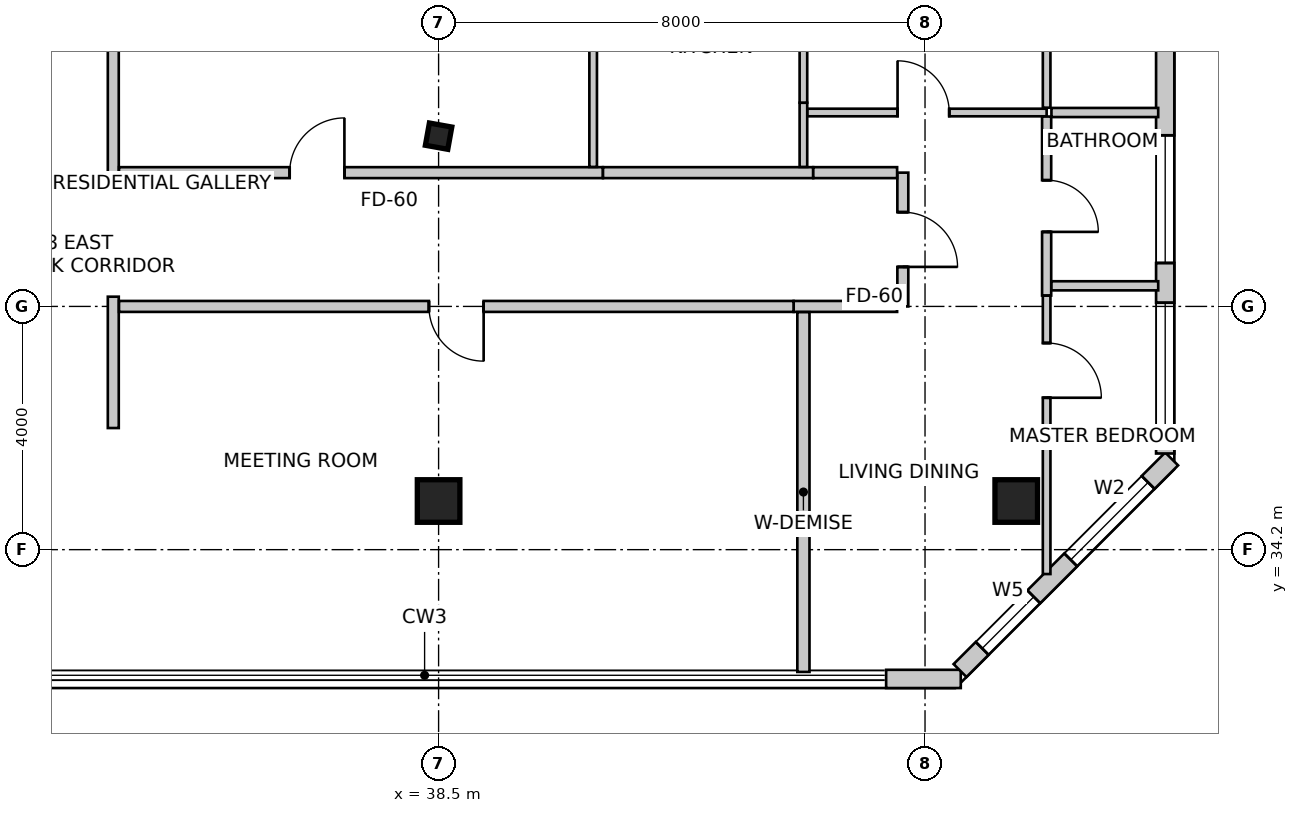
"""IFC4 building model, lengths in metres.
Left out: names, types, materials, properties, quantities, classifications, styles, units other than length and angle.
Written with IfcOpenShell. Run it as: python <this file> out.ifc"""

import sys

from ifc_helpers import new_model, si_unit, direction, frame, frame_2d, origin, origin_2d, place, context, subcontext, project, spatial, rectangle, i_section, extrude, source, transform, mapped, element, fill, save


model = new_model("IFC4")
c1 = context("Model", 3, precision=1e-05, world=origin(), true_north=direction((0.0, 1.0)))
c2 = subcontext(c1, "Body", "Model", "MODEL_VIEW")
j1 = project(units=[si_unit("LENGTHUNIT", "METRE"), si_unit("PLANEANGLEUNIT", "RADIAN")], contexts=[c1])
p1 = place(None, origin())
s1 = spatial("IfcSite", under=j1, at=p1, CompositionType="ELEMENT")
p2 = place(p1, origin())
s2 = spatial("IfcBuilding", under=s1, at=p2, CompositionType="ELEMENT")
p3 = place(p2, frame((0.0, 0.0, 193.9)))
s3 = spatial("IfcBuildingStorey", under=s2, at=p3, CompositionType="ELEMENT", Elevation=193.9)
m1 = source(origin(), c2, "Body", "SweptSolid", [
    extrude(rectangle(XDim=0.7, YDim=0.7, at=origin_2d()), origin(), (0.0, 0.0, 1.0), 3.5),
])
for number, where, z_axis, x_axis in (
    (1, (38.5, 35.0, 0.0), (0.0, 0.0, 1.0), (1.0, 0.0, 0.0)),
    (2, (48.0, 35.0, 0.0), (0.0, 0.0, 1.0), (1.0, 0.0, 0.0)),
):
    element("IfcColumn", number, at=place(p3, frame(where, z_axis=z_axis, x_axis=x_axis)), inside=s3, PredefinedType="COLUMN", context=c2, shape_type="MappedRepresentation", body=[
        mapped(m1, transform((0.0, 0.0, 0.0), scale=1.0)),
    ])
m2 = source(origin(), c2, "Body", "SweptSolid", [
    extrude(i_section(OverallWidth=0.374, OverallDepth=0.372, WebThickness=0.016, FlangeThickness=0.026, FilletRadius=0.015, at=origin_2d()), origin(), (0.0, 0.0, 1.0), 3.5),
])
p4 = place(p3, frame((38.5, 41.0, 0.0), z_axis=(0.0, 0.0, 1.0), x_axis=(0.984195607969, -0.17708474032, 0.0)))
e3 = element("IfcColumn", 3, at=p4, inside=s3, PredefinedType="COLUMN", context=c2, shape_type="MappedRepresentation", body=[
    mapped(m2, transform((0.0, 0.0, 0.0), scale=1.0)),
])
p5 = place(p3, frame((45.86, 32.074, 0.0), z_axis=(0.0, 0.0, 1.0), x_axis=(1.0, 0.0, 0.0)))
e4 = element("IfcWall", 4, at=p5, inside=s3, PredefinedType="SOLIDWALL", context=c2, shape_type="SweptSolid", body=[
    extrude(rectangle(XDim=1.228, YDim=0.3, at=frame_2d((0.614, 0.0))), origin(), (0.0, 0.0, 1.0), 3.25),
])
p6 = place(p3, frame((47.076, 32.212, 0.0), z_axis=(0.0, 0.0, 1.0), x_axis=(0.707106781187, 0.707106781187, 0.0)))
e5 = element("IfcWall", 5, at=p6, inside=s3, PredefinedType="SOLIDWALL", context=c2, shape_type="SweptSolid", body=[
    extrude(rectangle(XDim=4.922, YDim=0.3, at=frame_2d((2.461, 0.0))), origin(), (0.0, 0.0, 1.0), 3.25),
])
m3 = source(origin(), c2, "Body", "SweptSolid", [
    extrude(rectangle(XDim=1.2, YDim=1.6, at=frame_2d((0.6, 0.8))), frame((0.0, 0.16, 0.0), z_axis=(0.0, -1.0, 0.0), x_axis=(1.0, 0.0, 0.0)), (0.0, 0.0, 1.0), 0.32),
])
p7 = place(p6, frame((0.515, 0.0, 0.85)))
e6 = element("IfcOpeningElement", 6, at=p7, cuts=e5, PredefinedType="OPENING", context=c2, shape_type="MappedRepresentation", body=[
    mapped(m3, transform((0.0, 0.0, 0.0), scale=1.0)),
])
m4 = source(origin(), c2, "Body", "SweptSolid", [
    extrude(rectangle(XDim=1.8, YDim=2.1, at=frame_2d((0.9, 1.05))), frame((0.0, 0.16, 0.0), z_axis=(0.0, -1.0, 0.0), x_axis=(1.0, 0.0, 0.0)), (0.0, 0.0, 1.0), 0.32),
])
p8 = place(p6, frame((2.575, 0.0, 0.85)))
e7 = element("IfcOpeningElement", 7, at=p8, cuts=e5, PredefinedType="OPENING", context=c2, shape_type="MappedRepresentation", body=[
    mapped(m4, transform((0.0, 0.0, 0.0), scale=1.0)),
])
p9 = place(p3, frame((50.45, 35.781, 0.0), z_axis=(0.0, 0.0, 1.0), x_axis=(0.0, 1.0, 0.0)))
e8 = element("IfcWall", 8, at=p9, inside=s3, PredefinedType="SOLIDWALL", context=c2, shape_type="SweptSolid", body=[
    extrude(rectangle(XDim=10.731, YDim=0.3, at=frame_2d((5.365, 0.0))), origin(), (0.0, 0.0, 1.0), 3.25),
])
m5 = source(origin(), c2, "Body", "SweptSolid", [
    extrude(rectangle(XDim=2.1, YDim=2.0, at=frame_2d((1.05, 1.0))), frame((0.0, 0.16, 0.0), z_axis=(0.0, -1.0, 0.0), x_axis=(1.0, 0.0, 0.0)), (0.0, 0.0, 1.0), 0.32),
])
p10 = place(p9, frame((0.379, 0.0, 0.85)))
e9 = element("IfcOpeningElement", 9, at=p10, cuts=e8, PredefinedType="OPENING", context=c2, shape_type="MappedRepresentation", body=[
    mapped(m5, transform((0.0, 0.0, 0.0), scale=1.0)),
])
p11 = place(p9, frame((3.133, 0.0, 0.85)))
e10 = element("IfcOpeningElement", 10, at=p11, cuts=e8, PredefinedType="OPENING", context=c2, shape_type="MappedRepresentation", body=[
    mapped(m5, transform((0.0, 0.0, 0.0), scale=1.0)),
])
m6 = source(origin(), c2, "Body", "SweptSolid", [
    extrude(rectangle(XDim=2.4, YDim=2.2, at=frame_2d((1.2, 1.1))), frame((0.0, 0.16, 0.0), z_axis=(0.0, -1.0, 0.0), x_axis=(1.0, 0.0, 0.0)), (0.0, 0.0, 1.0), 0.32),
])
p12 = place(p9, frame((6.919, 0.0, 0.85)))
e11 = element("IfcOpeningElement", 11, at=p12, cuts=e8, PredefinedType="OPENING", context=c2, shape_type="MappedRepresentation", body=[
    mapped(m6, transform((0.0, 0.0, 0.0), scale=1.0)),
])
p13 = place(p3, frame((33.15, 45.766, 0.0), z_axis=(0.0, 0.0, 1.0), x_axis=(0.0, -1.0, 0.0)))
e12 = element("IfcWall", 12, at=p13, inside=s3, PredefinedType="PARTITIONING", context=c2, shape_type="SweptSolid", body=[
    extrude(rectangle(XDim=5.526, YDim=0.18, at=frame_2d((2.763, 0.0))), origin(), (0.0, 0.0, 1.0), 2.688),
])
p14 = place(p3, frame((33.15, 38.36, 0.0), z_axis=(0.0, 0.0, 1.0), x_axis=(0.0, -1.0, 0.0)))
e13 = element("IfcWall", 13, at=p14, inside=s3, PredefinedType="PARTITIONING", context=c2, shape_type="SweptSolid", body=[
    extrude(rectangle(XDim=2.16, YDim=0.18, at=frame_2d((1.08, 0.0))), origin(), (0.0, 0.0, 1.0), 3.25),
])
p15 = place(p3, frame((33.244, 40.4, 0.0), z_axis=(0.0, 0.0, 1.0), x_axis=(1.0, 0.0, 0.0)))
e14 = element("IfcWall", 14, at=p15, inside=s3, PredefinedType="PARTITIONING", context=c2, shape_type="SweptSolid", body=[
    extrude(rectangle(XDim=7.958, YDim=0.18, at=frame_2d((3.979, 0.0))), origin(), (0.0, 0.0, 1.0), 2.688),
])
m7 = source(origin(), c2, "Body", "SweptSolid", [
    extrude(rectangle(XDim=0.9, YDim=2.15, at=frame_2d((0.45, 1.075))), frame((0.0, 0.1, 0.0), z_axis=(0.0, -1.0, 0.0), x_axis=(1.0, 0.0, 0.0)), (0.0, 0.0, 1.0), 0.2),
])
p16 = place(p15, frame((2.807, 0.0, 0.0)))
e15 = element("IfcOpeningElement", 15, at=p16, cuts=e14, PredefinedType="OPENING", context=c2, shape_type="MappedRepresentation", body=[
    mapped(m7, transform((0.0, 0.0, 0.0), scale=1.0)),
])
p17 = place(p3, frame((41.204, 40.4, 0.0), z_axis=(0.0, 0.0, 1.0), x_axis=(1.0, 0.0, 0.0)))
e16 = element("IfcWall", 16, at=p17, inside=s3, PredefinedType="PARTITIONING", context=c2, shape_type="SweptSolid", body=[
    extrude(rectangle(XDim=3.456, YDim=0.18, at=frame_2d((1.728, 0.0))), origin(), (0.0, 0.0, 1.0), 2.688),
])
p18 = place(p3, frame((46.135, 40.4, 0.0), z_axis=(0.0, 0.0, 1.0), x_axis=(0.0, -1.0, 0.0)))
e17 = element("IfcWall", 17, at=p18, inside=s3, PredefinedType="PARTITIONING", context=c2, shape_type="SweptSolid", body=[
    extrude(rectangle(XDim=2.2, YDim=0.18, at=frame_2d((1.1, 0.0))), origin(), (0.0, 0.0, 1.0), 3.25),
])
p19 = place(p18, frame((0.65, 0.0, 0.0)))
e18 = element("IfcOpeningElement", 18, at=p19, cuts=e17, PredefinedType="OPENING", context=c2, shape_type="MappedRepresentation", body=[
    mapped(m7, transform((0.0, 0.0, 0.0), scale=1.0)),
])
p20 = place(p3, frame((44.662, 40.4, 0.0), z_axis=(0.0, 0.0, 1.0), x_axis=(1.0, 0.0, 0.0)))
e19 = element("IfcWall", 19, at=p20, inside=s3, PredefinedType="PARTITIONING", context=c2, shape_type="SweptSolid", body=[
    extrude(rectangle(XDim=1.379, YDim=0.18, at=frame_2d((0.689, 0.0))), origin(), (0.0, 0.0, 1.0), 3.25),
])
p21 = place(p3, frame((46.041, 38.2, 0.0), z_axis=(0.0, 0.0, 1.0), x_axis=(-1.0, 0.0, 0.0)))
e20 = element("IfcWall", 20, at=p21, inside=s3, PredefinedType="PARTITIONING", context=c2, shape_type="SweptSolid", body=[
    extrude(rectangle(XDim=1.701, YDim=0.18, at=frame_2d((0.851, 0.0))), origin(), (0.0, 0.0, 1.0), 2.835),
])
p22 = place(p3, frame((44.338, 38.2, 0.0), z_axis=(0.0, 0.0, 1.0), x_axis=(-1.0, 0.0, 0.0)))
e21 = element("IfcWall", 21, at=p22, inside=s3, PredefinedType="PARTITIONING", context=c2, shape_type="SweptSolid", body=[
    extrude(rectangle(XDim=11.094, YDim=0.18, at=frame_2d((5.547, 0.0))), origin(), (0.0, 0.0, 1.0), 2.688),
])
p23 = place(p22, frame((5.097, 0.0, 0.0)))
e22 = element("IfcOpeningElement", 22, at=p23, cuts=e21, PredefinedType="OPENING", context=c2, shape_type="MappedRepresentation", body=[
    mapped(m7, transform((0.0, 0.0, 0.0), scale=1.0)),
])
p24 = place(p3, frame((41.042, 45.606, 0.0), z_axis=(0.0, 0.0, 1.0), x_axis=(0.0, -1.0, 0.0)))
e23 = element("IfcWall", 23, at=p24, inside=s3, PredefinedType="PARTITIONING", context=c2, shape_type="SweptSolid", body=[
    extrude(rectangle(XDim=5.112, YDim=0.125, at=frame_2d((2.556, 0.0))), origin(), (0.0, 0.0, 1.0), 2.688),
])
m8 = source(origin(), c2, "Body", "SweptSolid", [
    extrude(rectangle(XDim=0.85, YDim=2.15, at=frame_2d((0.425, 1.075))), frame((0.0, 0.073, 0.0), z_axis=(0.0, -1.0, 0.0), x_axis=(1.0, 0.0, 0.0)), (0.0, 0.0, 1.0), 0.145),
])
p25 = place(p24, frame((2.131, 0.0, 0.0)))
e24 = element("IfcOpeningElement", 24, at=p25, cuts=e23, PredefinedType="OPENING", context=c2, shape_type="MappedRepresentation", body=[
    mapped(m8, transform((0.0, 0.0, 0.0), scale=1.0)),
])
p26 = place(p3, frame((44.5, 41.549, 0.0), z_axis=(0.0, 0.0, 1.0), x_axis=(0.0, -1.0, 0.0)))
e25 = element("IfcWall", 25, at=p26, inside=s3, PredefinedType="PARTITIONING", context=c2, shape_type="SweptSolid", body=[
    extrude(rectangle(XDim=1.055, YDim=0.125, at=frame_2d((0.528, 0.0))), origin(), (0.0, 0.0, 1.0), 2.688),
])
p27 = place(p3, frame((44.5, 44.827, 0.0), z_axis=(0.0, 0.0, 1.0), x_axis=(0.0, -1.0, 0.0)))
e26 = element("IfcWall", 26, at=p27, inside=s3, PredefinedType="PARTITIONING", context=c2, shape_type="SweptSolid", body=[
    extrude(rectangle(XDim=3.276, YDim=0.125, at=frame_2d((1.638, 0.0))), origin(), (0.0, 0.0, 1.0), 2.688),
])
p28 = place(p3, frame((44.566, 41.389, 0.0), z_axis=(0.0, 0.0, 1.0), x_axis=(1.0, 0.0, 0.0)))
e27 = element("IfcWall", 27, at=p28, inside=s3, PredefinedType="PARTITIONING", context=c2, shape_type="SweptSolid", body=[
    extrude(rectangle(XDim=3.934, YDim=0.125, at=frame_2d((1.967, 0.0))), origin(), (0.0, 0.0, 1.0), 2.766),
])
p29 = place(p28, frame((1.482, 0.0, 0.0)))
e28 = element("IfcOpeningElement", 28, at=p29, cuts=e27, PredefinedType="OPENING", context=c2, shape_type="MappedRepresentation", body=[
    mapped(m8, transform((0.0, 0.0, 0.0), scale=1.0)),
])
p30 = place(p3, frame((48.5, 41.323, 0.0), z_axis=(0.0, 0.0, 1.0), x_axis=(0.0, -1.0, 0.0)))
e29 = element("IfcWall", 29, at=p30, inside=s3, PredefinedType="PARTITIONING", context=c2, shape_type="SweptSolid", body=[
    extrude(rectangle(XDim=2.944, YDim=0.15, at=frame_2d((1.472, 0.0))), origin(), (0.0, 0.0, 1.0), 3.25),
])
m9 = source(origin(), c2, "Body", "SweptSolid", [
    extrude(rectangle(XDim=0.85, YDim=2.15, at=frame_2d((0.425, 1.075))), frame((0.0, 0.085, 0.0), z_axis=(0.0, -1.0, 0.0), x_axis=(1.0, 0.0, 0.0)), (0.0, 0.0, 1.0), 0.17),
])
p31 = place(p30, frame((1.047, 0.0, 0.0)))
e30 = element("IfcOpeningElement", 30, at=p31, cuts=e29, PredefinedType="OPENING", context=c2, shape_type="MappedRepresentation", body=[
    mapped(m9, transform((0.0, 0.0, 0.0), scale=1.0)),
])
p32 = place(p3, frame((48.5, 38.377, 0.0), z_axis=(0.0, 0.0, 1.0), x_axis=(0.0, -1.0, 0.0)))
e31 = element("IfcWall", 31, at=p32, inside=s3, PredefinedType="PARTITIONING", context=c2, shape_type="SweptSolid", body=[
    extrude(rectangle(XDim=4.578, YDim=0.125, at=frame_2d((2.289, 0.0))), origin(), (0.0, 0.0, 1.0), 3.25),
])
m10 = source(origin(), c2, "Body", "SweptSolid", [
    extrude(rectangle(XDim=0.9, YDim=2.15, at=frame_2d((0.45, 1.075))), frame((0.0, 0.073, 0.0), z_axis=(0.0, -1.0, 0.0), x_axis=(1.0, 0.0, 0.0)), (0.0, 0.0, 1.0), 0.145),
])
p33 = place(p32, frame((0.779, 0.0, 0.0)))
e32 = element("IfcOpeningElement", 32, at=p33, cuts=e31, PredefinedType="OPENING", context=c2, shape_type="MappedRepresentation", body=[
    mapped(m10, transform((0.0, 0.0, 0.0), scale=1.0)),
])
p34 = place(p3, frame((44.5, 32.189, 0.0), z_axis=(0.0, 0.0, 1.0), x_axis=(0.0, 1.0, 0.0)))
e33 = element("IfcWall", 33, at=p34, inside=s3, PredefinedType="PARTITIONING", context=c2, shape_type="SweptSolid", body=[
    extrude(rectangle(XDim=5.917, YDim=0.2, at=frame_2d((2.958, 0.0))), origin(), (0.0, 0.0, 1.0), 2.542),
])
p35 = place(p3, frame((48.5, 44.923, 0.0), z_axis=(0.0, 0.0, 1.0), x_axis=(0.0, -1.0, 0.0)))
e34 = element("IfcWall", 34, at=p35, inside=s3, PredefinedType="PARTITIONING", context=c2, shape_type="SweptSolid", body=[
    extrude(rectangle(XDim=3.455, YDim=0.125, at=frame_2d((1.727, 0.0))), origin(), (0.0, 0.0, 1.0), 3.25),
])
p36 = place(p35, frame((1.277, 0.0, 0.0)))
e35 = element("IfcOpeningElement", 35, at=p36, cuts=e34, PredefinedType="OPENING", context=c2, shape_type="MappedRepresentation", body=[
    mapped(m10, transform((0.0, 0.0, 0.0), scale=1.0)),
])
for number, where, z_axis, x_axis in (
    (36, (48.579, 41.389, 0.0), (0.0, 0.0, 1.0), (1.0, 0.0, 0.0)),
    (37, (50.335, 38.539, 0.0), (0.0, 0.0, 1.0), (-1.0, 0.0, 0.0)),
):
    element("IfcWall", number, at=place(p3, frame(where, z_axis=z_axis, x_axis=x_axis)), inside=s3, PredefinedType="PARTITIONING", context=c2, shape_type="SweptSolid", body=[
        extrude(rectangle(XDim=1.756, YDim=0.15, at=frame_2d((0.878, 0.0))), origin(), (0.0, 0.0, 1.0), 3.25),
    ])
m11 = source(origin(), c2, "Body", "SweptSolid", [
    extrude(rectangle(XDim=1.2, YDim=1.6, at=frame_2d((0.6, 0.8))), frame((0.0, -0.015, 0.0), z_axis=(0.0, -1.0, 0.0), x_axis=(1.0, 0.0, 0.0)), (0.0, 0.0, 1.0), 0.06),
])
p37 = place(p7, origin())
e38 = element("IfcWindow", 38, at=p37, inside=s3, PartitioningType="SINGLE_PANEL", PredefinedType="WINDOW", context=c2, shape_type="MappedRepresentation", body=[
    mapped(m11, transform((0.0, 0.0, 0.0), scale=1.0)),
])
fill(e6, e38)
m12 = source(origin(), c2, "Body", "SweptSolid", [
    extrude(rectangle(XDim=1.8, YDim=2.1, at=frame_2d((0.9, 1.05))), frame((0.0, -0.015, 0.0), z_axis=(0.0, -1.0, 0.0), x_axis=(1.0, 0.0, 0.0)), (0.0, 0.0, 1.0), 0.06),
])
p38 = place(p8, origin())
e39 = element("IfcWindow", 39, at=p38, inside=s3, PartitioningType="SINGLE_PANEL", PredefinedType="WINDOW", context=c2, shape_type="MappedRepresentation", body=[
    mapped(m12, transform((0.0, 0.0, 0.0), scale=1.0)),
])
fill(e7, e39)
m13 = source(origin(), c2, "Body", "SweptSolid", [
    extrude(rectangle(XDim=2.1, YDim=2.0, at=frame_2d((1.05, 1.0))), frame((0.0, -0.015, 0.0), z_axis=(0.0, -1.0, 0.0), x_axis=(1.0, 0.0, 0.0)), (0.0, 0.0, 1.0), 0.06),
])
p39 = place(p10, origin())
e40 = element("IfcWindow", 40, at=p39, inside=s3, PartitioningType="SINGLE_PANEL", PredefinedType="WINDOW", context=c2, shape_type="MappedRepresentation", body=[
    mapped(m13, transform((0.0, 0.0, 0.0), scale=1.0)),
])
fill(e9, e40)
p40 = place(p11, origin())
e41 = element("IfcWindow", 41, at=p40, inside=s3, PartitioningType="SINGLE_PANEL", PredefinedType="WINDOW", context=c2, shape_type="MappedRepresentation", body=[
    mapped(m13, transform((0.0, 0.0, 0.0), scale=1.0)),
])
fill(e10, e41)
m14 = source(origin(), c2, "Body", "SweptSolid", [
    extrude(rectangle(XDim=0.9, YDim=2.15, at=frame_2d((0.45, 1.075))), frame((0.0, 0.025, 0.0), z_axis=(0.0, -1.0, 0.0), x_axis=(1.0, 0.0, 0.0)), (0.0, 0.0, 1.0), 0.05),
])
p41 = place(p16, origin())
e42 = element("IfcDoor", 42, at=p41, inside=s3, OperationType="SINGLE_SWING_RIGHT", PredefinedType="DOOR", context=c2, shape_type="MappedRepresentation", body=[
    mapped(m14, transform((0.0, 0.0, 0.0), scale=1.0)),
])
fill(e15, e42)
p42 = place(p19, origin())
e43 = element("IfcDoor", 43, at=p42, inside=s3, OperationType="SINGLE_SWING_RIGHT", PredefinedType="DOOR", context=c2, shape_type="MappedRepresentation", body=[
    mapped(m14, transform((0.0, 0.0, 0.0), scale=1.0)),
])
fill(e18, e43)
m15 = source(origin(), c2, "Body", "SweptSolid", [
    extrude(rectangle(XDim=0.85, YDim=2.15, at=frame_2d((0.425, 1.075))), frame((0.0, 0.025, 0.0), z_axis=(0.0, -1.0, 0.0), x_axis=(1.0, 0.0, 0.0)), (0.0, 0.0, 1.0), 0.05),
])
p43 = place(p29, origin())
e44 = element("IfcDoor", 44, at=p43, inside=s3, OperationType="SINGLE_SWING_LEFT", PredefinedType="DOOR", context=c2, shape_type="MappedRepresentation", body=[
    mapped(m15, transform((0.0, 0.0, 0.0), scale=1.0)),
])
fill(e28, e44)
p44 = place(p31, origin())
e45 = element("IfcDoor", 45, at=p44, inside=s3, OperationType="SINGLE_SWING_RIGHT", PredefinedType="DOOR", context=c2, shape_type="MappedRepresentation", body=[
    mapped(m15, transform((0.0, 0.0, 0.0), scale=1.0)),
])
fill(e30, e45)
m16 = source(origin(), c2, "Body", "SweptSolid", [
    extrude(rectangle(XDim=0.9, YDim=2.15, at=frame_2d((0.45, 1.075))), frame((0.0, 0.025, 0.0), z_axis=(0.0, -1.0, 0.0), x_axis=(1.0, 0.0, 0.0)), (0.0, 0.0, 1.0), 0.05),
])
p45 = place(p33, origin())
e46 = element("IfcDoor", 46, at=p45, inside=s3, OperationType="SINGLE_SWING_RIGHT", PredefinedType="DOOR", context=c2, shape_type="MappedRepresentation", body=[
    mapped(m16, transform((0.0, 0.0, 0.0), scale=1.0)),
])
fill(e32, e46)
p46 = place(p23, origin())
e47 = element("IfcDoor", 47, at=p46, inside=s3, OperationType="SINGLE_SWING_LEFT", PredefinedType="DOOR", context=c2, shape_type="MappedRepresentation", body=[
    mapped(m16, transform((0.0, 0.0, 0.0), scale=1.0)),
])
fill(e22, e47)
save(model, sys.argv[1])
